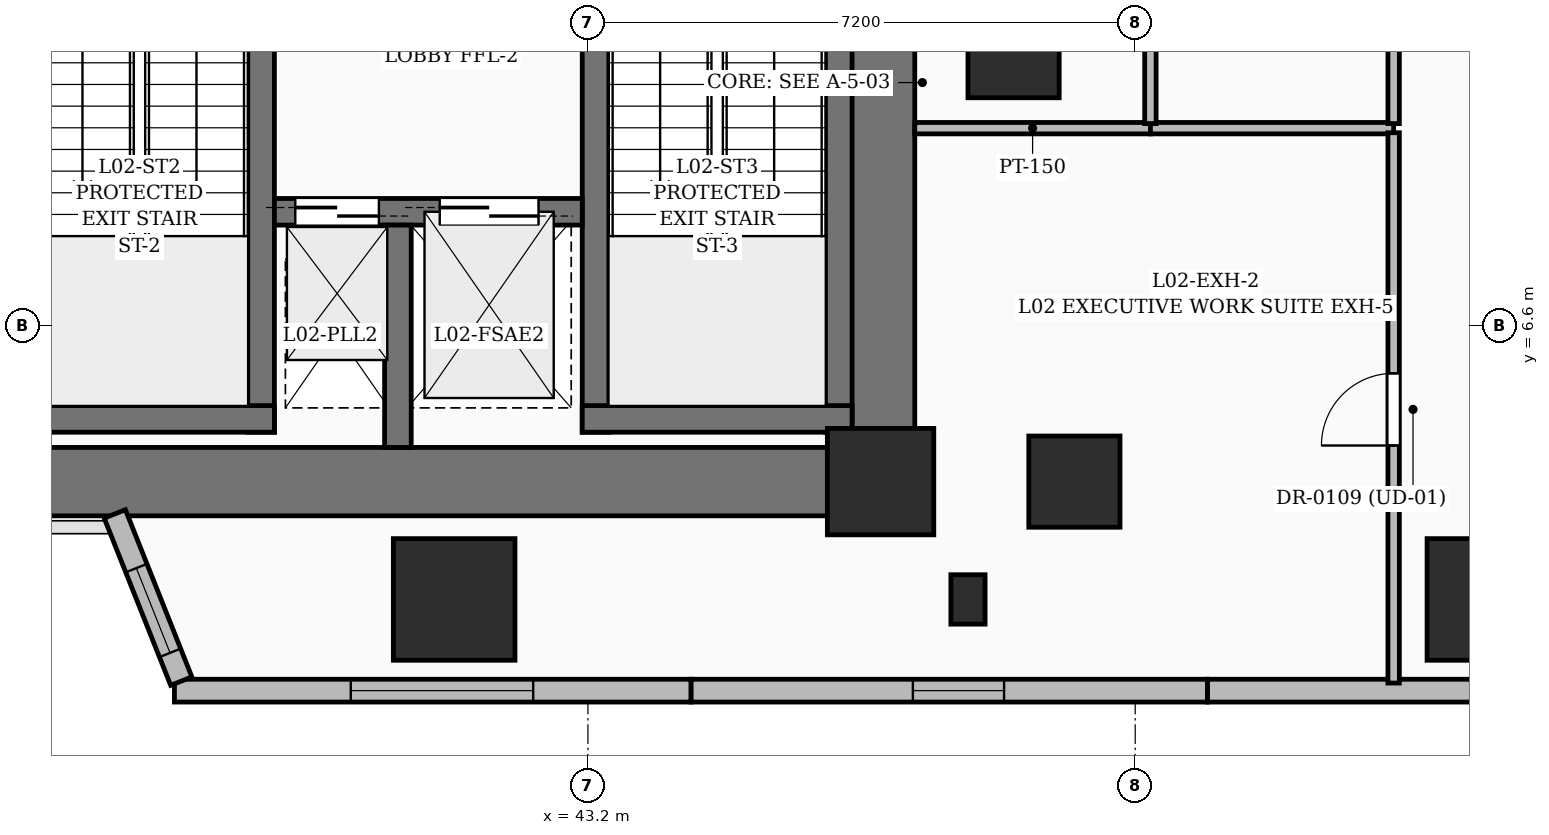
"""IFC4 building model, lengths in metres.
Left out: names, types, materials, properties, quantities, classifications, styles, units other than length and angle.
Written with IfcOpenShell. Run it as: python <this file> out.ifc"""

import sys

from ifc_helpers import new_model, si_unit, direction, frame, frame_2d, origin, origin_2d, place, context, subcontext, project, spatial, rectangle, extrude, element, fill, save


model = new_model("IFC4")
c1 = context("Model", 3, precision=1e-05, world=origin(), true_north=direction((0.0, 1.0)))
c2 = subcontext(c1, "Body", "Model", "MODEL_VIEW")
j1 = project(units=[si_unit("LENGTHUNIT", "METRE"), si_unit("PLANEANGLEUNIT", "RADIAN")], contexts=[c1])
p1 = place(None, origin())
s1 = spatial("IfcSite", under=j1, at=p1, CompositionType="ELEMENT")
p2 = place(p1, origin())
s2 = spatial("IfcBuilding", under=s1, at=p2, CompositionType="ELEMENT")
p3 = place(p2, frame((0.0, 0.0, 12.9)))
s3 = spatial("IfcBuildingStorey", under=s2, at=p3, CompositionType="ELEMENT", Elevation=12.9)
p4 = place(p3, frame((47.05, 4.55, 0.0), z_axis=(0.0, 0.0, 1.0), x_axis=(1.0, 0.0, 0.0)))
e1 = element("IfcColumn", 1, at=p4, inside=s3, PredefinedType="COLUMN", context=c2, shape_type="SweptSolid", body=[
    extrude(rectangle(XDim=1.4, YDim=1.4, at=origin_2d()), origin(), (0.0, 0.0, 1.0), 4.5),
])
for number, where, z_axis, x_axis in (
    (2, (49.6, 4.55, 0.0), (0.0, 0.0, 1.0), (1.0, 0.0, 0.0)),
    (3, (48.8, 10.2, 0.0), (0.0, 0.0, 1.0), (1.0, 0.0, 0.0)),
):
    element("IfcColumn", number, at=place(p3, frame(where, z_axis=z_axis, x_axis=x_axis)), inside=s3, PredefinedType="COLUMN", context=c2, shape_type="SweptSolid", body=[
        extrude(rectangle(XDim=1.2, YDim=1.2, at=origin_2d()), origin(), (0.0, 0.0, 1.0), 4.5),
    ])
p5 = place(p3, frame((35.85, 4.55, 0.0), z_axis=(0.0, 0.0, 1.0), x_axis=(1.0, 0.0, 0.0)))
e4 = element("IfcWall", 4, at=p5, inside=s3, PredefinedType="SHEAR", context=c2, shape_type="SweptSolid", body=[
    extrude(rectangle(XDim=10.5, YDim=0.9, at=frame_2d((5.25, 0.0))), origin(), (0.0, 0.0, 1.0), 4.5),
])
p6 = place(p3, frame((47.05, 5.25, 0.0), z_axis=(0.0, 0.0, 1.0), x_axis=(0.0, 1.0, 0.0)))
e5 = element("IfcWall", 5, at=p6, inside=s3, PredefinedType="SHEAR", context=c2, shape_type="SweptSolid", body=[
    extrude(rectangle(XDim=8.8, YDim=0.9, at=frame_2d((4.4, 0.0))), origin(), (0.0, 0.0, 1.0), 4.5),
])
p7 = place(p3, frame((38.9, 5.2, 0.0), z_axis=(0.0, 0.0, 1.0), x_axis=(0.0, 1.0, 0.0)))
e6 = element("IfcWall", 6, at=p7, inside=s3, PredefinedType="SOLIDWALL", context=c2, shape_type="SweptSolid", body=[
    extrude(rectangle(XDim=9.1, YDim=0.35, at=frame_2d((4.55, 0.0))), origin(), (0.0, 0.0, 1.0), 4.5),
])
p8 = place(p7, frame((6.02, 0.0, 0.0)))
e7 = element("IfcOpeningElement", 7, at=p8, cuts=e6, PredefinedType="OPENING", context=c2, shape_type="SweptSolid", body=[
    extrude(rectangle(XDim=1.0, YDim=2.15, at=frame_2d((0.5, 1.075))), frame((0.0, 0.185, 0.0), z_axis=(0.0, -1.0, 0.0), x_axis=(1.0, 0.0, 0.0)), (0.0, 0.0, 1.0), 0.37),
])
p9 = place(p3, frame((35.525, 5.375, 0.0), z_axis=(0.0, 0.0, 1.0), x_axis=(1.0, 0.0, 0.0)))
e8 = element("IfcWall", 8, at=p9, inside=s3, PredefinedType="SOLIDWALL", context=c2, shape_type="SweptSolid", body=[
    extrude(rectangle(XDim=3.55, YDim=0.35, at=frame_2d((1.775, 0.0))), origin(), (0.0, 0.0, 1.0), 4.5),
])
p10 = place(p3, frame((43.3, 5.2, 0.0), z_axis=(0.0, 0.0, 1.0), x_axis=(0.0, 1.0, 0.0)))
e9 = element("IfcWall", 9, at=p10, inside=s3, PredefinedType="SOLIDWALL", context=c2, shape_type="SweptSolid", body=[
    extrude(rectangle(XDim=9.1, YDim=0.35, at=frame_2d((4.55, 0.0))), origin(), (0.0, 0.0, 1.0), 4.5),
])
p11 = place(p10, frame((6.02, 0.0, 0.0)))
e10 = element("IfcOpeningElement", 10, at=p11, cuts=e9, PredefinedType="OPENING", context=c2, shape_type="SweptSolid", body=[
    extrude(rectangle(XDim=1.0, YDim=2.15, at=frame_2d((0.5, 1.075))), frame((0.0, 0.185, 0.0), z_axis=(0.0, -1.0, 0.0), x_axis=(1.0, 0.0, 0.0)), (0.0, 0.0, 1.0), 0.37),
])
p12 = place(p3, frame((46.5, 5.2, 0.0), z_axis=(0.0, 0.0, 1.0), x_axis=(0.0, 1.0, 0.0)))
e11 = element("IfcWall", 11, at=p12, inside=s3, PredefinedType="SOLIDWALL", context=c2, shape_type="SweptSolid", body=[
    extrude(rectangle(XDim=9.1, YDim=0.35, at=frame_2d((4.55, 0.0))), origin(), (0.0, 0.0, 1.0), 4.5),
])
p13 = place(p3, frame((43.125, 5.375, 0.0), z_axis=(0.0, 0.0, 1.0), x_axis=(1.0, 0.0, 0.0)))
e12 = element("IfcWall", 12, at=p13, inside=s3, PredefinedType="SOLIDWALL", context=c2, shape_type="SweptSolid", body=[
    extrude(rectangle(XDim=3.55, YDim=0.35, at=frame_2d((1.775, 0.0))), origin(), (0.0, 0.0, 1.0), 4.5),
])
p14 = place(p3, frame((39.075, 8.1, 0.0), z_axis=(0.0, 0.0, 1.0), x_axis=(1.0, 0.0, 0.0)))
e13 = element("IfcWall", 13, at=p14, inside=s3, PredefinedType="SOLIDWALL", context=c2, shape_type="SweptSolid", body=[
    extrude(rectangle(XDim=4.05, YDim=0.35, at=frame_2d((2.025, 0.0))), origin(), (0.0, 0.0, 1.0), 4.5),
])
p15 = place(p14, frame((2.175, 0.0, 0.0)))
e14 = element("IfcOpeningElement", 14, at=p15, cuts=e13, PredefinedType="OPENING", context=c2, shape_type="SweptSolid", body=[
    extrude(rectangle(XDim=1.3, YDim=2.25, at=frame_2d((0.65, 1.125))), frame((0.0, 0.185, 0.0), z_axis=(0.0, -1.0, 0.0), x_axis=(1.0, 0.0, 0.0)), (0.0, 0.0, 1.0), 0.37),
])
p16 = place(p14, frame((0.275, 0.0, 0.0)))
e15 = element("IfcOpeningElement", 15, at=p16, cuts=e13, PredefinedType="OPENING", context=c2, shape_type="SweptSolid", body=[
    extrude(rectangle(XDim=1.1, YDim=2.2, at=frame_2d((0.55, 1.1))), frame((0.0, 0.185, 0.0), z_axis=(0.0, -1.0, 0.0), x_axis=(1.0, 0.0, 0.0)), (0.0, 0.0, 1.0), 0.37),
])
p17 = place(p3, frame((40.7, 5.0, 0.0), z_axis=(0.0, 0.0, 1.0), x_axis=(0.0, 1.0, 0.0)))
e16 = element("IfcWall", 16, at=p17, inside=s3, PredefinedType="SOLIDWALL", context=c2, shape_type="SweptSolid", body=[
    extrude(rectangle(XDim=2.925, YDim=0.35, at=frame_2d((1.462, 0.0))), origin(), (0.0, 0.0, 1.0), 4.5),
])
for number, where, z_axis, x_axis in (
    (17, (41.44, 3.0, 0.0), (0.0, 0.0, 1.0), (1.0, 0.0, 0.0)),
    (18, (55.04, 3.0, 0.0), (0.0, 0.0, 1.0), (1.0, 0.0, 0.0)),
):
    element("IfcColumn", number, at=place(p3, frame(where, z_axis=z_axis, x_axis=x_axis)), inside=s3, PredefinedType="COLUMN", context=c2, shape_type="SweptSolid", body=[
        extrude(rectangle(XDim=1.6, YDim=1.6, at=origin_2d()), origin(), (0.0, 0.0, 1.0), 4.5),
    ])
p18 = place(p3, frame((48.2, 3.0, 0.0), z_axis=(0.0, 0.0, 1.0), x_axis=(1.0, 0.0, 0.0)))
e19 = element("IfcColumn", 19, at=p18, inside=s3, PredefinedType="PILASTER", context=c2, shape_type="SweptSolid", body=[
    extrude(rectangle(XDim=0.45, YDim=0.65, at=origin_2d()), origin(), (0.0, 0.0, 1.0), 4.5),
])
p19 = place(p3, frame((58.145, 1.8, 0.0), z_axis=(0.0, 0.0, 1.0), x_axis=(-1.0, 0.0, 0.0)))
e20 = element("IfcWall", 20, at=p19, inside=s3, PredefinedType="SOLIDWALL", context=c2, shape_type="SweptSolid", body=[
    extrude(rectangle(XDim=6.795, YDim=0.3, at=frame_2d((3.397, 0.0))), origin(), (0.0, 0.0, 1.0), 4.2),
])
p20 = place(p19, frame((1.525, 0.0, 0.6)))
e21 = element("IfcOpeningElement", 21, at=p20, cuts=e20, PredefinedType="OPENING", context=c2, shape_type="SweptSolid", body=[
    extrude(rectangle(XDim=1.5, YDim=2.1, at=frame_2d((0.75, 1.05))), frame((0.0, 0.16, 0.0), z_axis=(0.0, -1.0, 0.0), x_axis=(1.0, 0.0, 0.0)), (0.0, 0.0, 1.0), 0.32),
])
p21 = place(p3, frame((51.35, 1.8, 0.0), z_axis=(0.0, 0.0, 1.0), x_axis=(-1.0, 0.0, 0.0)))
e22 = element("IfcWall", 22, at=p21, inside=s3, PredefinedType="SOLIDWALL", context=c2, shape_type="SweptSolid", body=[
    extrude(rectangle(XDim=6.795, YDim=0.3, at=frame_2d((3.397, 0.0))), origin(), (0.0, 0.0, 1.0), 4.2),
])
p22 = place(p21, frame((2.675, 0.0, 0.8)))
e23 = element("IfcOpeningElement", 23, at=p22, cuts=e22, PredefinedType="OPENING", context=c2, shape_type="SweptSolid", body=[
    extrude(rectangle(XDim=1.2, YDim=1.8, at=frame_2d((0.6, 0.9))), frame((0.0, 0.16, 0.0), z_axis=(0.0, -1.0, 0.0), x_axis=(1.0, 0.0, 0.0)), (0.0, 0.0, 1.0), 0.32),
])
p23 = place(p3, frame((44.555, 1.8, 0.0), z_axis=(0.0, 0.0, 1.0), x_axis=(-1.0, 0.0, 0.0)))
e24 = element("IfcWall", 24, at=p23, inside=s3, PredefinedType="SOLIDWALL", context=c2, shape_type="SweptSolid", body=[
    extrude(rectangle(XDim=6.795, YDim=0.3, at=frame_2d((3.397, 0.0))), origin(), (0.0, 0.0, 1.0), 4.2),
])
p24 = place(p23, frame((2.075, 0.0, 0.6)))
e25 = element("IfcOpeningElement", 25, at=p24, cuts=e24, PredefinedType="OPENING", context=c2, shape_type="SweptSolid", body=[
    extrude(rectangle(XDim=2.4, YDim=2.1, at=frame_2d((1.2, 1.05))), frame((0.0, 0.16, 0.0), z_axis=(0.0, -1.0, 0.0), x_axis=(1.0, 0.0, 0.0)), (0.0, 0.0, 1.0), 0.32),
])
p25 = place(p3, frame((37.85, 1.925, 0.0), z_axis=(0.0, 0.0, 1.0), x_axis=(-0.36946923074, 0.92924296475, 0.0)))
e26 = element("IfcWall", 26, at=p25, inside=s3, PredefinedType="SOLIDWALL", context=c2, shape_type="SweptSolid", body=[
    extrude(rectangle(XDim=2.367, YDim=0.3, at=frame_2d((1.184, 0.0))), origin(), (0.0, 0.0, 1.0), 2.975),
])
p26 = place(p25, frame((0.4, 0.0, 0.8)))
e27 = element("IfcOpeningElement", 27, at=p26, cuts=e26, PredefinedType="OPENING", context=c2, shape_type="SweptSolid", body=[
    extrude(rectangle(XDim=1.2, YDim=1.8, at=frame_2d((0.6, 0.9))), frame((0.0, 0.16, 0.0), z_axis=(0.0, -1.0, 0.0), x_axis=(1.0, 0.0, 0.0)), (0.0, 0.0, 1.0), 0.32),
])
p27 = place(p3, frame((50.6, 9.2, 0.0), z_axis=(0.0, 0.0, 1.0), x_axis=(-1.0, 0.0, 0.0)))
e28 = element("IfcWall", 28, at=p27, inside=s3, PredefinedType="PARTITIONING", context=c2, shape_type="SweptSolid", body=[
    extrude(rectangle(XDim=3.1, YDim=0.15, at=frame_2d((1.55, 0.0))), origin(), (0.0, 0.0, 1.0), 3.159),
])
p28 = place(p3, frame((53.8, 9.2, 0.0), z_axis=(0.0, 0.0, 1.0), x_axis=(-1.0, 0.0, 0.0)))
e29 = element("IfcWall", 29, at=p28, inside=s3, PredefinedType="PARTITIONING", context=c2, shape_type="SweptSolid", body=[
    extrude(rectangle(XDim=3.2, YDim=0.15, at=frame_2d((1.6, 0.0))), origin(), (0.0, 0.0, 1.0), 3.637),
])
p29 = place(p3, frame((53.8, 1.9, 0.0), z_axis=(0.0, 0.0, 1.0), x_axis=(0.0, 1.0, 0.0)))
e30 = element("IfcWall", 30, at=p29, inside=s3, PredefinedType="PARTITIONING", context=c2, shape_type="SweptSolid", body=[
    extrude(rectangle(XDim=7.24, YDim=0.15, at=frame_2d((3.62, 0.0))), origin(), (0.0, 0.0, 1.0), 2.97),
])
p30 = place(p29, frame((3.125, 0.0, 0.0)))
e31 = element("IfcOpeningElement", 31, at=p30, cuts=e30, PredefinedType="OPENING", context=c2, shape_type="SweptSolid", body=[
    extrude(rectangle(XDim=0.95, YDim=2.2, at=frame_2d((0.475, 1.1))), frame((0.0, 0.085, 0.0), z_axis=(0.0, -1.0, 0.0), x_axis=(1.0, 0.0, 0.0)), (0.0, 0.0, 1.0), 0.17),
])
for number, where, z_axis, x_axis in (
    (32, (50.6, 9.26, 0.0), (0.0, 0.0, 1.0), (0.0, 1.0, 0.0)),
    (33, (53.8, 9.26, 0.0), (0.0, 0.0, 1.0), (0.0, 1.0, 0.0)),
):
    element("IfcWall", number, at=place(p3, frame(where, z_axis=z_axis, x_axis=x_axis)), inside=s3, PredefinedType="PARTITIONING", context=c2, shape_type="SweptSolid", body=[
        extrude(rectangle(XDim=6.09, YDim=0.15, at=frame_2d((3.045, 0.0))), origin(), (0.0, 0.0, 1.0), 3.078),
    ])
p31 = place(p22, origin())
e34 = element("IfcWindow", 34, at=p31, inside=s3, PartitioningType="SINGLE_PANEL", PredefinedType="WINDOW", context=c2, shape_type="SweptSolid", body=[
    extrude(rectangle(XDim=1.2, YDim=1.8, at=frame_2d((0.6, 0.9))), frame((0.0, 0.03, 0.0), z_axis=(0.0, -1.0, 0.0), x_axis=(1.0, 0.0, 0.0)), (0.0, 0.0, 1.0), 0.06),
])
fill(e23, e34)
p32 = place(p24, origin())
e35 = element("IfcWindow", 35, at=p32, inside=s3, PartitioningType="SINGLE_PANEL", PredefinedType="WINDOW", context=c2, shape_type="SweptSolid", body=[
    extrude(rectangle(XDim=2.4, YDim=2.1, at=frame_2d((1.2, 1.05))), frame((0.0, 0.03, 0.0), z_axis=(0.0, -1.0, 0.0), x_axis=(1.0, 0.0, 0.0)), (0.0, 0.0, 1.0), 0.06),
])
fill(e25, e35)
p33 = place(p26, origin())
e36 = element("IfcWindow", 36, at=p33, inside=s3, PartitioningType="SINGLE_PANEL", PredefinedType="WINDOW", context=c2, shape_type="SweptSolid", body=[
    extrude(rectangle(XDim=1.2, YDim=1.8, at=frame_2d((0.6, 0.9))), frame((0.0, 0.03, 0.0), z_axis=(0.0, -1.0, 0.0), x_axis=(1.0, 0.0, 0.0)), (0.0, 0.0, 1.0), 0.06),
])
fill(e27, e36)
p34 = place(p15, origin())
e37 = element("IfcDoor", 37, at=p34, inside=s3, OperationType="DOUBLE_DOOR_SLIDING", PredefinedType="DOOR", context=c2, shape_type="SweptSolid", body=[
    extrude(rectangle(XDim=1.3, YDim=2.25, at=frame_2d((0.65, 1.125))), frame((0.0, 0.025, 0.0), z_axis=(0.0, -1.0, 0.0), x_axis=(1.0, 0.0, 0.0)), (0.0, 0.0, 1.0), 0.05),
])
fill(e14, e37)
p35 = place(p16, origin())
e38 = element("IfcDoor", 38, at=p35, inside=s3, OperationType="DOUBLE_DOOR_SLIDING", PredefinedType="DOOR", context=c2, shape_type="SweptSolid", body=[
    extrude(rectangle(XDim=1.1, YDim=2.2, at=frame_2d((0.55, 1.1))), frame((0.0, 0.025, 0.0), z_axis=(0.0, -1.0, 0.0), x_axis=(1.0, 0.0, 0.0)), (0.0, 0.0, 1.0), 0.05),
])
fill(e15, e38)
p36 = place(p30, origin())
e39 = element("IfcDoor", 39, at=p36, inside=s3, OperationType="SINGLE_SWING_LEFT", PredefinedType="DOOR", context=c2, shape_type="SweptSolid", body=[
    extrude(rectangle(XDim=0.95, YDim=2.2, at=frame_2d((0.475, 1.1))), frame((0.0, 0.025, 0.0), z_axis=(0.0, -1.0, 0.0), x_axis=(1.0, 0.0, 0.0)), (0.0, 0.0, 1.0), 0.05),
])
fill(e31, e39)
save(model, sys.argv[1])
